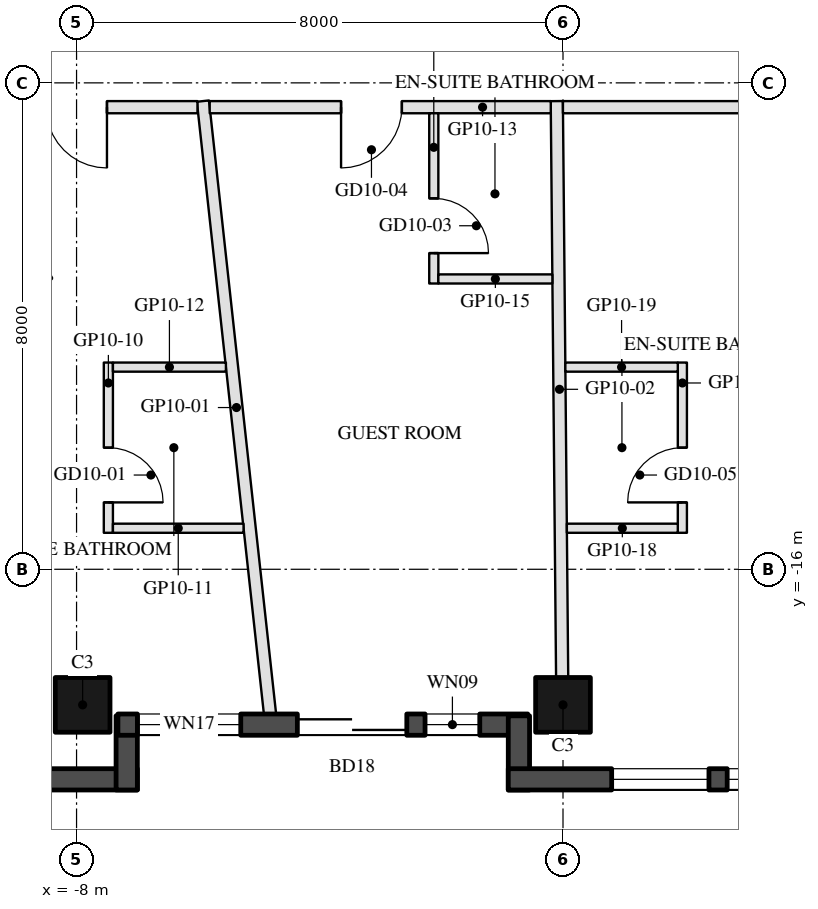
"""IFC4 building model, lengths in metres.
Left out: names, types, materials, properties, quantities, classifications, styles, units other than length and angle.
Written with IfcOpenShell. Run it as: python <this file> out.ifc"""

import sys

from ifc_helpers import new_model, si_unit, direction, frame, frame_2d, origin, origin_2d, place, context, subcontext, project, spatial, rectangle, hollow_rectangle, extrude, element, fill, save


model = new_model("IFC4")
c1 = context("Model", 3, precision=1e-05, world=origin(), true_north=direction((0.0, 1.0)))
c2 = subcontext(c1, "Body", "Model", "MODEL_VIEW")
j1 = project(units=[si_unit("LENGTHUNIT", "METRE"), si_unit("PLANEANGLEUNIT", "RADIAN")], contexts=[c1])
p1 = place(None, origin())
s1 = spatial("IfcSite", under=j1, at=p1, CompositionType="ELEMENT")
p2 = place(p1, origin())
s2 = spatial("IfcBuilding", under=s1, at=p2, CompositionType="ELEMENT")
p3 = place(p2, frame((0.0, 0.0, 116.8)))
s3 = spatial("IfcBuildingStorey", under=s2, at=p3, CompositionType="ELEMENT", Elevation=116.8)
for number, where, z_axis, x_axis in (
    (1, (-7.9, -18.23, 0.0), (0.0, 0.0, 1.0), (-1.0, 0.0, 0.0)),
    (2, (0.0, -18.23, 0.0), (0.0, 0.0, 1.0), (-1.0, 0.0, 0.0)),
):
    element("IfcColumn", number, at=place(p3, frame(where, z_axis=z_axis, x_axis=x_axis)), inside=s3, PredefinedType="COLUMN", context=c2, shape_type="SweptSolid", body=[
        extrude(hollow_rectangle(XDim=0.9, YDim=0.9, WallThickness=0.04, at=origin_2d()), origin(), (0.0, 0.0, 1.0), 3.7),
    ])
p4 = place(p3, frame((-18.816, -19.455, 0.0), z_axis=(0.0, 0.0, 1.0), x_axis=(1.0, 0.0, 0.0)))
e3 = element("IfcWall", 3, at=p4, inside=s3, PredefinedType="SOLIDWALL", context=c2, shape_type="SweptSolid", body=[
    extrude(rectangle(XDim=11.816, YDim=0.35, at=frame_2d((5.908, 0.0))), origin(), (0.0, 0.0, 1.0), 3.55),
])
p5 = place(p4, frame((0.381, 0.0, 0.3)))
e4 = element("IfcOpeningElement", 4, at=p5, cuts=e3, PredefinedType="OPENING", context=c2, shape_type="SweptSolid", body=[
    extrude(rectangle(XDim=1.8, YDim=2.65, at=frame_2d((0.9, 1.325))), frame((0.0, 0.185, 0.0), z_axis=(0.0, -1.0, 0.0), x_axis=(1.0, 0.0, 0.0)), (0.0, 0.0, 1.0), 0.37),
])
p6 = place(p4, frame((7.716, 0.0, 0.0)))
e5 = element("IfcOpeningElement", 5, at=p6, cuts=e3, PredefinedType="OPENING", context=c2, shape_type="SweptSolid", body=[
    extrude(rectangle(XDim=2.4, YDim=2.4, at=frame_2d((1.2, 1.2))), frame((0.0, 0.185, 0.0), z_axis=(0.0, -1.0, 0.0), x_axis=(1.0, 0.0, 0.0)), (0.0, 0.0, 1.0), 0.37),
])
p7 = place(p4, frame((3.816, 0.0, 0.3)))
e6 = element("IfcOpeningElement", 6, at=p7, cuts=e3, PredefinedType="OPENING", context=c2, shape_type="SweptSolid", body=[
    extrude(rectangle(XDim=1.6, YDim=2.65, at=frame_2d((0.8, 1.325))), frame((0.0, 0.185, 0.0), z_axis=(0.0, -1.0, 0.0), x_axis=(1.0, 0.0, 0.0)), (0.0, 0.0, 1.0), 0.37),
])
p8 = place(p4, frame((5.716, 0.0, 0.3)))
e7 = element("IfcOpeningElement", 7, at=p8, cuts=e3, PredefinedType="OPENING", context=c2, shape_type="SweptSolid", body=[
    extrude(rectangle(XDim=1.6, YDim=2.65, at=frame_2d((0.8, 1.325))), frame((0.0, 0.185, 0.0), z_axis=(0.0, -1.0, 0.0), x_axis=(1.0, 0.0, 0.0)), (0.0, 0.0, 1.0), 0.37),
])
p9 = place(p3, frame((-7.175, -19.63, 0.0), z_axis=(0.0, 0.0, 1.0), x_axis=(0.0, 1.0, 0.0)))
e8 = element("IfcWall", 8, at=p9, inside=s3, PredefinedType="SOLIDWALL", context=c2, shape_type="SweptSolid", body=[
    extrude(rectangle(XDim=1.22, YDim=0.35, at=frame_2d((0.61, 0.0))), origin(), (0.0, 0.0, 1.0), 3.55),
])
p10 = place(p3, frame((-7.32, -18.555, 0.0), z_axis=(0.0, 0.0, 1.0), x_axis=(1.0, 0.0, 0.0)))
e9 = element("IfcWall", 9, at=p10, inside=s3, PredefinedType="SOLIDWALL", context=c2, shape_type="SweptSolid", body=[
    extrude(rectangle(XDim=6.74, YDim=0.35, at=frame_2d((3.37, 0.0))), origin(), (0.0, 0.0, 1.0), 3.55),
])
p11 = place(p10, frame((0.32, 0.0, 0.3)))
e10 = element("IfcOpeningElement", 10, at=p11, cuts=e9, PredefinedType="OPENING", context=c2, shape_type="SweptSolid", body=[
    extrude(rectangle(XDim=1.7, YDim=2.65, at=frame_2d((0.85, 1.325))), frame((0.0, 0.185, 0.0), z_axis=(0.0, -1.0, 0.0), x_axis=(1.0, 0.0, 0.0)), (0.0, 0.0, 1.0), 0.37),
])
p12 = place(p10, frame((2.951, 0.0, 0.0)))
e11 = element("IfcOpeningElement", 11, at=p12, cuts=e9, PredefinedType="OPENING", context=c2, shape_type="SweptSolid", body=[
    extrude(rectangle(XDim=1.8, YDim=2.4, at=frame_2d((0.9, 1.2))), frame((0.0, 0.185, 0.0), z_axis=(0.0, -1.0, 0.0), x_axis=(1.0, 0.0, 0.0)), (0.0, 0.0, 1.0), 0.37),
])
p13 = place(p10, frame((5.051, 0.0, 0.3)))
e12 = element("IfcOpeningElement", 12, at=p13, cuts=e9, PredefinedType="OPENING", context=c2, shape_type="SweptSolid", body=[
    extrude(rectangle(XDim=0.9, YDim=2.65, at=frame_2d((0.45, 1.325))), frame((0.0, 0.185, 0.0), z_axis=(0.0, -1.0, 0.0), x_axis=(1.0, 0.0, 0.0)), (0.0, 0.0, 1.0), 0.37),
])
p14 = place(p3, frame((-0.725, -18.41, 0.0), z_axis=(0.0, 0.0, 1.0), x_axis=(0.0, -1.0, 0.0)))
e13 = element("IfcWall", 13, at=p14, inside=s3, PredefinedType="SOLIDWALL", context=c2, shape_type="SweptSolid", body=[
    extrude(rectangle(XDim=1.22, YDim=0.35, at=frame_2d((0.61, 0.0))), origin(), (0.0, 0.0, 1.0), 3.55),
])
p15 = place(p3, frame((-0.9, -19.455, 0.0), z_axis=(0.0, 0.0, 1.0), x_axis=(1.0, 0.0, 0.0)))
e14 = element("IfcWall", 14, at=p15, inside=s3, PredefinedType="SOLIDWALL", context=c2, shape_type="SweptSolid", body=[
    extrude(rectangle(XDim=9.7, YDim=0.35, at=frame_2d((4.85, 0.0))), origin(), (0.0, 0.0, 1.0), 3.55),
])
p16 = place(p15, frame((5.6, 0.0, 0.0)))
e15 = element("IfcOpeningElement", 15, at=p16, cuts=e14, PredefinedType="OPENING", context=c2, shape_type="SweptSolid", body=[
    extrude(rectangle(XDim=2.4, YDim=2.4, at=frame_2d((1.2, 1.2))), frame((0.0, 0.185, 0.0), z_axis=(0.0, -1.0, 0.0), x_axis=(1.0, 0.0, 0.0)), (0.0, 0.0, 1.0), 0.37),
])
p17 = place(p15, frame((1.7, 0.0, 0.3)))
e16 = element("IfcOpeningElement", 16, at=p17, cuts=e14, PredefinedType="OPENING", context=c2, shape_type="SweptSolid", body=[
    extrude(rectangle(XDim=1.6, YDim=2.65, at=frame_2d((0.8, 1.325))), frame((0.0, 0.185, 0.0), z_axis=(0.0, -1.0, 0.0), x_axis=(1.0, 0.0, 0.0)), (0.0, 0.0, 1.0), 0.37),
])
p18 = place(p15, frame((3.6, 0.0, 0.3)))
e17 = element("IfcOpeningElement", 17, at=p18, cuts=e14, PredefinedType="OPENING", context=c2, shape_type="SweptSolid", body=[
    extrude(rectangle(XDim=1.6, YDim=2.65, at=frame_2d((0.8, 1.325))), frame((0.0, 0.185, 0.0), z_axis=(0.0, -1.0, 0.0), x_axis=(1.0, 0.0, 0.0)), (0.0, 0.0, 1.0), 0.37),
])
p19 = place(p3, frame((-4.819, -18.38, 0.0), z_axis=(0.0, 0.0, 1.0), x_axis=(-0.108803544125, 0.994063272023, 0.0)))
e18 = element("IfcWall", 18, at=p19, inside=s3, PredefinedType="PARTITIONING", context=c2, shape_type="SweptSolid", body=[
    extrude(rectangle(XDim=10.14, YDim=0.2, at=frame_2d((5.07, 0.0))), origin(), (0.0, 0.0, 1.0), 2.96),
])
p20 = place(p3, frame((-0.014, -17.78, 0.0), z_axis=(0.0, 0.0, 1.0), x_axis=(-0.00927078365, 0.999957025362, 0.0)))
e19 = element("IfcWall", 19, at=p20, inside=s3, PredefinedType="PARTITIONING", context=c2, shape_type="SweptSolid", body=[
    extrude(rectangle(XDim=9.48, YDim=0.2, at=frame_2d((4.74, 0.0))), origin(), (0.0, 0.0, 1.0), 2.95),
])
p21 = place(p3, frame((-6.011, -8.4, 0.0), z_axis=(0.0, 0.0, 1.0), x_axis=(-1.0, 0.0, 0.0)))
e20 = element("IfcWall", 20, at=p21, inside=s3, PredefinedType="PARTITIONING", context=c2, shape_type="SweptSolid", body=[
    extrude(rectangle(XDim=3.977, YDim=0.2, at=frame_2d((1.988, 0.0))), origin(), (0.0, 0.0, 1.0), 2.95),
])
p22 = place(p21, frame((1.488, 0.0, 0.0)))
e21 = element("IfcOpeningElement", 21, at=p22, cuts=e20, PredefinedType="OPENING", context=c2, shape_type="SweptSolid", body=[
    extrude(rectangle(XDim=1.0, YDim=2.1, at=frame_2d((0.5, 1.05))), frame((0.0, 0.11, 0.0), z_axis=(0.0, -1.0, 0.0), x_axis=(1.0, 0.0, 0.0)), (0.0, 0.0, 1.0), 0.22),
])
p23 = place(p3, frame((-7.477, -12.6, 0.0), z_axis=(0.0, 0.0, 1.0), x_axis=(0.0, -1.0, 0.0)))
e22 = element("IfcWall", 22, at=p23, inside=s3, PredefinedType="PARTITIONING", context=c2, shape_type="SweptSolid", body=[
    extrude(rectangle(XDim=2.8, YDim=0.15, at=frame_2d((1.4, 0.0))), origin(), (0.0, 0.0, 1.0), 3.55),
])
p24 = place(p23, frame((1.4, 0.0, 0.0)))
e23 = element("IfcOpeningElement", 23, at=p24, cuts=e22, PredefinedType="OPENING", context=c2, shape_type="SweptSolid", body=[
    extrude(rectangle(XDim=0.9, YDim=2.1, at=frame_2d((0.45, 1.05))), frame((0.0, 0.085, 0.0), z_axis=(0.0, -1.0, 0.0), x_axis=(1.0, 0.0, 0.0)), (0.0, 0.0, 1.0), 0.17),
])
p25 = place(p3, frame((-7.402, -15.325, 0.0), z_axis=(0.0, 0.0, 1.0), x_axis=(1.0, 0.0, 0.0)))
e24 = element("IfcWall", 24, at=p25, inside=s3, PredefinedType="PARTITIONING", context=c2, shape_type="SweptSolid", body=[
    extrude(rectangle(XDim=2.148, YDim=0.15, at=frame_2d((1.074, 0.0))), origin(), (0.0, 0.0, 1.0), 3.55),
])
p26 = place(p3, frame((-7.402, -12.675, 0.0), z_axis=(0.0, 0.0, 1.0), x_axis=(1.0, 0.0, 0.0)))
e25 = element("IfcWall", 25, at=p26, inside=s3, PredefinedType="PARTITIONING", context=c2, shape_type="SweptSolid", body=[
    extrude(rectangle(XDim=1.858, YDim=0.15, at=frame_2d((0.929, 0.0))), origin(), (0.0, 0.0, 1.0), 3.55),
])
p27 = place(p3, frame((-0.201, -8.4, 0.0), z_axis=(0.0, 0.0, 1.0), x_axis=(-1.0, 0.0, 0.0)))
e26 = element("IfcWall", 26, at=p27, inside=s3, PredefinedType="PARTITIONING", context=c2, shape_type="SweptSolid", body=[
    extrude(rectangle(XDim=5.609, YDim=0.2, at=frame_2d((2.805, 0.0))), origin(), (0.0, 0.0, 1.0), 2.95),
])
p28 = place(p27, frame((2.449, 0.0, 0.0)))
e27 = element("IfcOpeningElement", 27, at=p28, cuts=e26, PredefinedType="OPENING", context=c2, shape_type="SweptSolid", body=[
    extrude(rectangle(XDim=1.0, YDim=2.1, at=frame_2d((0.5, 1.05))), frame((0.0, 0.11, 0.0), z_axis=(0.0, -1.0, 0.0), x_axis=(1.0, 0.0, 0.0)), (0.0, 0.0, 1.0), 0.22),
])
p29 = place(p3, frame((-2.125, -8.5, 0.0), z_axis=(0.0, 0.0, 1.0), x_axis=(0.0, -1.0, 0.0)))
e28 = element("IfcWall", 28, at=p29, inside=s3, PredefinedType="PARTITIONING", context=c2, shape_type="SweptSolid", body=[
    extrude(rectangle(XDim=2.8, YDim=0.15, at=frame_2d((1.4, 0.0))), origin(), (0.0, 0.0, 1.0), 3.55),
])
p30 = place(p29, frame((1.4, 0.0, 0.0)))
e29 = element("IfcOpeningElement", 29, at=p30, cuts=e28, PredefinedType="OPENING", context=c2, shape_type="SweptSolid", body=[
    extrude(rectangle(XDim=0.9, YDim=2.1, at=frame_2d((0.45, 1.05))), frame((0.0, 0.085, 0.0), z_axis=(0.0, -1.0, 0.0), x_axis=(1.0, 0.0, 0.0)), (0.0, 0.0, 1.0), 0.17),
])
p31 = place(p3, frame((-2.05, -11.225, 0.0), z_axis=(0.0, 0.0, 1.0), x_axis=(1.0, 0.0, 0.0)))
e30 = element("IfcWall", 30, at=p31, inside=s3, PredefinedType="PARTITIONING", context=c2, shape_type="SweptSolid", body=[
    extrude(rectangle(XDim=1.875, YDim=0.15, at=frame_2d((0.938, 0.0))), origin(), (0.0, 0.0, 1.0), 3.55),
])
p32 = place(p3, frame((9.988, -8.4, 0.0), z_axis=(0.0, 0.0, 1.0), x_axis=(-1.0, 0.0, 0.0)))
e31 = element("IfcWall", 31, at=p32, inside=s3, PredefinedType="PARTITIONING", context=c2, shape_type="SweptSolid", body=[
    extrude(rectangle(XDim=9.989, YDim=0.2, at=frame_2d((4.995, 0.0))), origin(), (0.0, 0.0, 1.0), 2.95),
])
p33 = place(p32, frame((4.495, 0.0, 0.0)))
e32 = element("IfcOpeningElement", 32, at=p33, cuts=e31, PredefinedType="OPENING", context=c2, shape_type="SweptSolid", body=[
    extrude(rectangle(XDim=1.0, YDim=2.1, at=frame_2d((0.5, 1.05))), frame((0.0, 0.11, 0.0), z_axis=(0.0, -1.0, 0.0), x_axis=(1.0, 0.0, 0.0)), (0.0, 0.0, 1.0), 0.22),
])
p34 = place(p3, frame((1.963, -15.4, 0.0), z_axis=(0.0, 0.0, 1.0), x_axis=(0.0, 1.0, 0.0)))
e33 = element("IfcWall", 33, at=p34, inside=s3, PredefinedType="PARTITIONING", context=c2, shape_type="SweptSolid", body=[
    extrude(rectangle(XDim=2.8, YDim=0.15, at=frame_2d((1.4, 0.0))), origin(), (0.0, 0.0, 1.0), 3.55),
])
p35 = place(p34, frame((0.5, 0.0, 0.0)))
e34 = element("IfcOpeningElement", 34, at=p35, cuts=e33, PredefinedType="OPENING", context=c2, shape_type="SweptSolid", body=[
    extrude(rectangle(XDim=0.9, YDim=2.1, at=frame_2d((0.45, 1.05))), frame((0.0, 0.085, 0.0), z_axis=(0.0, -1.0, 0.0), x_axis=(1.0, 0.0, 0.0)), (0.0, 0.0, 1.0), 0.17),
])
p36 = place(p3, frame((0.063, -15.325, 0.0), z_axis=(0.0, 0.0, 1.0), x_axis=(1.0, 0.0, 0.0)))
e35 = element("IfcWall", 35, at=p36, inside=s3, PredefinedType="PARTITIONING", context=c2, shape_type="SweptSolid", body=[
    extrude(rectangle(XDim=1.825, YDim=0.15, at=frame_2d((0.912, 0.0))), origin(), (0.0, 0.0, 1.0), 2.95),
])
p37 = place(p3, frame((0.039, -12.675, 0.0), z_axis=(0.0, 0.0, 1.0), x_axis=(1.0, 0.0, 0.0)))
e36 = element("IfcWall", 36, at=p37, inside=s3, PredefinedType="PARTITIONING", context=c2, shape_type="SweptSolid", body=[
    extrude(rectangle(XDim=1.849, YDim=0.15, at=frame_2d((0.925, 0.0))), origin(), (0.0, 0.0, 1.0), 2.95),
])
p38 = place(p11, origin())
e37 = element("IfcWindow", 37, at=p38, inside=s3, PartitioningType="SINGLE_PANEL", PredefinedType="WINDOW", context=c2, shape_type="SweptSolid", body=[
    extrude(rectangle(XDim=1.7, YDim=2.65, at=frame_2d((0.85, 1.325))), frame((0.0, 0.03, 0.0), z_axis=(0.0, -1.0, 0.0), x_axis=(1.0, 0.0, 0.0)), (0.0, 0.0, 1.0), 0.06),
])
fill(e10, e37)
p39 = place(p12, frame((1.8, 0.0, 0.0), z_axis=(0.0, 0.0, 1.0), x_axis=(-1.0, 0.0, 0.0)))
e38 = element("IfcDoor", 38, at=p39, inside=s3, OperationType="SLIDING_TO_LEFT", PredefinedType="DOOR", context=c2, shape_type="SweptSolid", body=[
    extrude(rectangle(XDim=1.8, YDim=2.4, at=frame_2d((0.9, 1.2))), frame((0.0, 0.025, 0.0), z_axis=(0.0, -1.0, 0.0), x_axis=(1.0, 0.0, 0.0)), (0.0, 0.0, 1.0), 0.05),
])
fill(e11, e38)
p40 = place(p13, origin())
e39 = element("IfcWindow", 39, at=p40, inside=s3, PartitioningType="SINGLE_PANEL", PredefinedType="WINDOW", context=c2, shape_type="SweptSolid", body=[
    extrude(rectangle(XDim=0.9, YDim=2.65, at=frame_2d((0.45, 1.325))), frame((0.0, 0.03, 0.0), z_axis=(0.0, -1.0, 0.0), x_axis=(1.0, 0.0, 0.0)), (0.0, 0.0, 1.0), 0.06),
])
fill(e12, e39)
p41 = place(p17, origin())
e40 = element("IfcWindow", 40, at=p41, inside=s3, PartitioningType="SINGLE_PANEL", PredefinedType="WINDOW", context=c2, shape_type="SweptSolid", body=[
    extrude(rectangle(XDim=1.6, YDim=2.65, at=frame_2d((0.8, 1.325))), frame((0.0, 0.03, 0.0), z_axis=(0.0, -1.0, 0.0), x_axis=(1.0, 0.0, 0.0)), (0.0, 0.0, 1.0), 0.06),
])
fill(e16, e40)
p42 = place(p18, origin())
e41 = element("IfcWindow", 41, at=p42, inside=s3, PartitioningType="SINGLE_PANEL", PredefinedType="WINDOW", context=c2, shape_type="SweptSolid", body=[
    extrude(rectangle(XDim=1.6, YDim=2.65, at=frame_2d((0.8, 1.325))), frame((0.0, 0.03, 0.0), z_axis=(0.0, -1.0, 0.0), x_axis=(1.0, 0.0, 0.0)), (0.0, 0.0, 1.0), 0.06),
])
fill(e17, e41)
p43 = place(p24, origin())
e42 = element("IfcDoor", 42, at=p43, inside=s3, OperationType="SINGLE_SWING_RIGHT", PredefinedType="DOOR", context=c2, shape_type="SweptSolid", body=[
    extrude(rectangle(XDim=0.9, YDim=2.1, at=frame_2d((0.45, 1.05))), frame((0.0, 0.025, 0.0), z_axis=(0.0, -1.0, 0.0), x_axis=(1.0, 0.0, 0.0)), (0.0, 0.0, 1.0), 0.05),
])
fill(e23, e42)
p44 = place(p22, origin())
e43 = element("IfcDoor", 43, at=p44, inside=s3, OperationType="SINGLE_SWING_LEFT", PredefinedType="DOOR", context=c2, shape_type="SweptSolid", body=[
    extrude(rectangle(XDim=1.0, YDim=2.1, at=frame_2d((0.5, 1.05))), frame((0.0, 0.025, 0.0), z_axis=(0.0, -1.0, 0.0), x_axis=(1.0, 0.0, 0.0)), (0.0, 0.0, 1.0), 0.05),
])
fill(e21, e43)
p45 = place(p30, origin())
e44 = element("IfcDoor", 44, at=p45, inside=s3, OperationType="SINGLE_SWING_RIGHT", PredefinedType="DOOR", context=c2, shape_type="SweptSolid", body=[
    extrude(rectangle(XDim=0.9, YDim=2.1, at=frame_2d((0.45, 1.05))), frame((0.0, 0.025, 0.0), z_axis=(0.0, -1.0, 0.0), x_axis=(1.0, 0.0, 0.0)), (0.0, 0.0, 1.0), 0.05),
])
fill(e29, e44)
p46 = place(p28, origin())
e45 = element("IfcDoor", 45, at=p46, inside=s3, OperationType="SINGLE_SWING_RIGHT", PredefinedType="DOOR", context=c2, shape_type="SweptSolid", body=[
    extrude(rectangle(XDim=1.0, YDim=2.1, at=frame_2d((0.5, 1.05))), frame((0.0, 0.025, 0.0), z_axis=(0.0, -1.0, 0.0), x_axis=(1.0, 0.0, 0.0)), (0.0, 0.0, 1.0), 0.05),
])
fill(e27, e45)
p47 = place(p35, origin())
e46 = element("IfcDoor", 46, at=p47, inside=s3, OperationType="SINGLE_SWING_LEFT", PredefinedType="DOOR", context=c2, shape_type="SweptSolid", body=[
    extrude(rectangle(XDim=0.9, YDim=2.1, at=frame_2d((0.45, 1.05))), frame((0.0, 0.025, 0.0), z_axis=(0.0, -1.0, 0.0), x_axis=(1.0, 0.0, 0.0)), (0.0, 0.0, 1.0), 0.05),
])
fill(e34, e46)
save(model, sys.argv[1])
